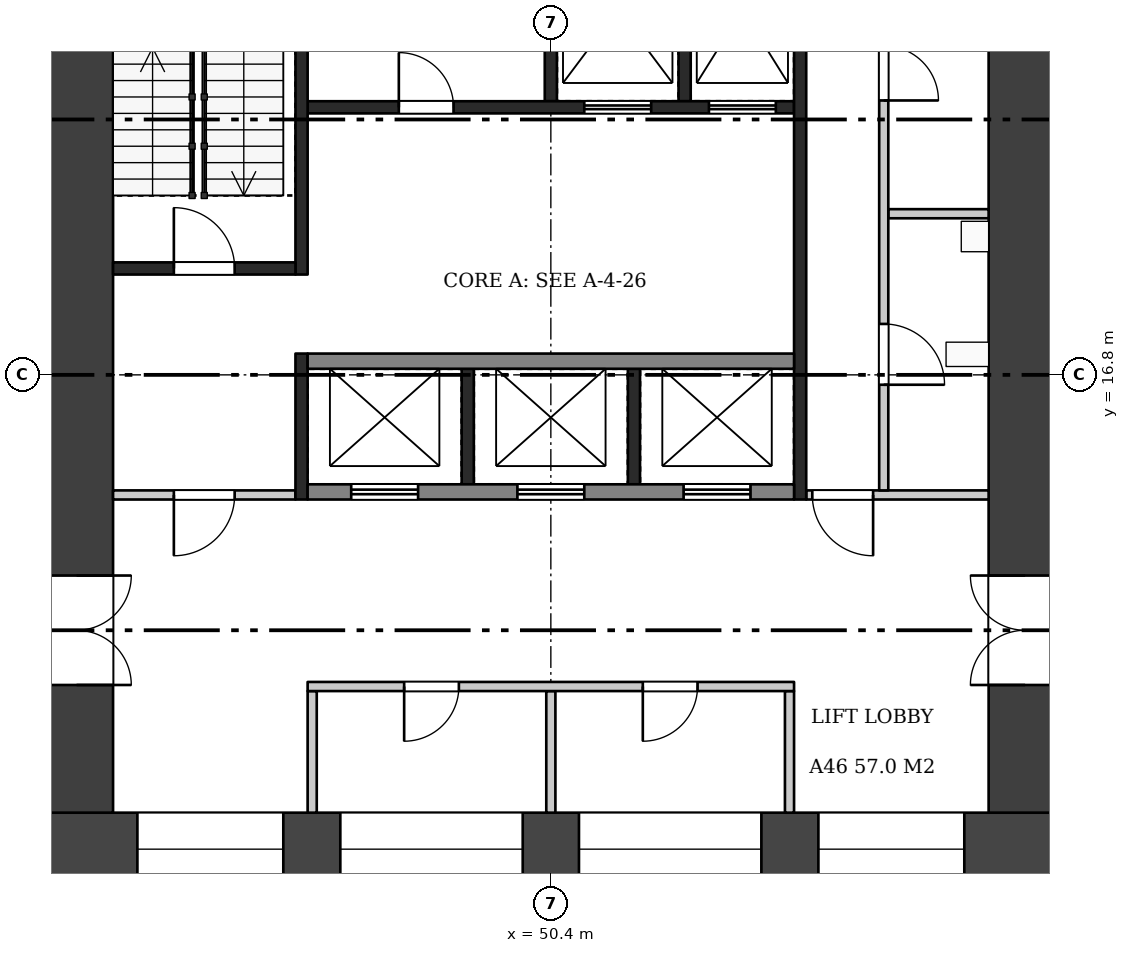
"""IFC4 building model, lengths in metres.
Left out: names, types, materials, properties, quantities, classifications, styles, units other than length and angle.
Written with IfcOpenShell. Run it as: python <this file> out.ifc"""

import sys

from ifc_helpers import new_model, si_unit, direction, frame, frame_2d, origin, place, context, subcontext, project, spatial, rectangle, extrude, element, fill, save


model = new_model("IFC4")
c1 = context("Model", 3, precision=1e-05, world=origin(), true_north=direction((0.0, 1.0)))
c2 = subcontext(c1, "Body", "Model", "MODEL_VIEW")
j1 = project(units=[si_unit("LENGTHUNIT", "METRE"), si_unit("PLANEANGLEUNIT", "RADIAN")], contexts=[c1])
p1 = place(None, origin())
s1 = spatial("IfcSite", under=j1, at=p1, CompositionType="ELEMENT")
p2 = place(p1, origin())
s2 = spatial("IfcBuilding", under=s1, at=p2, CompositionType="ELEMENT")
p3 = place(p2, frame((0.0, 0.0, 179.2)))
s3 = spatial("IfcBuildingStorey", under=s2, at=p3, CompositionType="ELEMENT", Elevation=179.2)
p4 = place(p3, frame((42.0, 9.0, 0.0), z_axis=(0.0, 0.0, 1.0), x_axis=(1.0, 0.0, 0.0)))
e1 = element("IfcWall", 1, at=p4, inside=s3, PredefinedType="SHEAR", context=c2, shape_type="SweptSolid", body=[
    extrude(rectangle(XDim=16.8, YDim=1.2, at=frame_2d((8.4, 0.0))), origin(), (0.0, 0.0, 1.0), 3.22),
])
p5 = place(p4, frame((1.6, 0.0, 0.6)))
e2 = element("IfcOpeningElement", 2, at=p5, cuts=e1, PredefinedType="OPENING", context=c2, shape_type="SweptSolid", body=[
    extrude(rectangle(XDim=2.4, YDim=2.1, at=frame_2d((1.2, 1.05))), frame((0.0, 0.61, 0.0), z_axis=(0.0, -1.0, 0.0), x_axis=(1.0, 0.0, 0.0)), (0.0, 0.0, 1.0), 1.22),
])
p6 = place(p4, frame((4.938, 0.0, 1.6)))
e3 = element("IfcOpeningElement", 3, at=p6, cuts=e1, PredefinedType="OPENING", context=c2, shape_type="SweptSolid", body=[
    extrude(rectangle(XDim=3.0, YDim=1.2, at=frame_2d((1.5, 0.6))), frame((0.0, 0.61, 0.0), z_axis=(0.0, -1.0, 0.0), x_axis=(1.0, 0.0, 0.0)), (0.0, 0.0, 1.0), 1.22),
])
p7 = place(p4, frame((8.863, 0.0, 1.6)))
e4 = element("IfcOpeningElement", 4, at=p7, cuts=e1, PredefinedType="OPENING", context=c2, shape_type="SweptSolid", body=[
    extrude(rectangle(XDim=3.0, YDim=1.2, at=frame_2d((1.5, 0.6))), frame((0.0, 0.61, 0.0), z_axis=(0.0, -1.0, 0.0), x_axis=(1.0, 0.0, 0.0)), (0.0, 0.0, 1.0), 1.22),
])
p8 = place(p4, frame((12.8, 0.0, 0.6)))
e5 = element("IfcOpeningElement", 5, at=p8, cuts=e1, PredefinedType="OPENING", context=c2, shape_type="SweptSolid", body=[
    extrude(rectangle(XDim=2.4, YDim=2.1, at=frame_2d((1.2, 1.05))), frame((0.0, 0.61, 0.0), z_axis=(0.0, -1.0, 0.0), x_axis=(1.0, 0.0, 0.0)), (0.0, 0.0, 1.0), 1.22),
])
p9 = place(p3, frame((42.6, 9.6, 0.0), z_axis=(0.0, 0.0, 1.0), x_axis=(0.0, 1.0, 0.0)))
e6 = element("IfcWall", 6, at=p9, inside=s3, PredefinedType="SHEAR", context=c2, shape_type="SweptSolid", body=[
    extrude(rectangle(XDim=14.4, YDim=1.2, at=frame_2d((7.2, 0.0))), origin(), (0.0, 0.0, 1.0), 3.22),
])
p10 = place(p9, frame((2.1, 0.0, 0.0)))
e7 = element("IfcOpeningElement", 7, at=p10, cuts=e6, PredefinedType="OPENING", context=c2, shape_type="SweptSolid", body=[
    extrude(rectangle(XDim=1.8, YDim=2.1, at=frame_2d((0.9, 1.05))), frame((0.0, 0.61, 0.0), z_axis=(0.0, -1.0, 0.0), x_axis=(1.0, 0.0, 0.0)), (0.0, 0.0, 1.0), 1.22),
])
p11 = place(p3, frame((58.2, 9.6, 0.0), z_axis=(0.0, 0.0, 1.0), x_axis=(0.0, 1.0, 0.0)))
e8 = element("IfcWall", 8, at=p11, inside=s3, PredefinedType="SHEAR", context=c2, shape_type="SweptSolid", body=[
    extrude(rectangle(XDim=14.4, YDim=1.2, at=frame_2d((7.2, 0.0))), origin(), (0.0, 0.0, 1.0), 3.22),
])
p12 = place(p11, frame((2.1, 0.0, 0.0)))
e9 = element("IfcOpeningElement", 9, at=p12, cuts=e8, PredefinedType="OPENING", context=c2, shape_type="SweptSolid", body=[
    extrude(rectangle(XDim=1.8, YDim=2.1, at=frame_2d((0.9, 1.05))), frame((0.0, 0.61, 0.0), z_axis=(0.0, -1.0, 0.0), x_axis=(1.0, 0.0, 0.0)), (0.0, 0.0, 1.0), 1.22),
])
for number, where, z_axis, x_axis in (
    (10, (46.475, 9.6, 0.0), (0.0, 0.0, 1.0), (0.0, 1.0, 0.0)),
    (11, (54.325, 9.6, 0.0), (0.0, 0.0, 1.0), (0.0, 1.0, 0.0)),
    (12, (50.4, 9.6, 0.0), (0.0, 0.0, 1.0), (0.0, 1.0, 0.0)),
):
    element("IfcWall", number, at=place(p3, frame(where, z_axis=z_axis, x_axis=x_axis)), inside=s3, PredefinedType="PARTITIONING", context=c2, shape_type="SweptSolid", body=[
        extrude(rectangle(XDim=2.0, YDim=0.15, at=frame_2d((1.0, 0.0))), origin(), (0.0, 0.0, 1.0), 3.22),
    ])
p13 = place(p3, frame((46.4, 11.675, 0.0), z_axis=(0.0, 0.0, 1.0), x_axis=(1.0, 0.0, 0.0)))
e13 = element("IfcWall", 13, at=p13, inside=s3, PredefinedType="PARTITIONING", context=c2, shape_type="SweptSolid", body=[
    extrude(rectangle(XDim=8.0, YDim=0.15, at=frame_2d((4.0, 0.0))), origin(), (0.0, 0.0, 1.0), 3.22),
])
p14 = place(p13, frame((1.587, 0.0, 0.0)))
e14 = element("IfcOpeningElement", 14, at=p14, cuts=e13, PredefinedType="OPENING", context=c2, shape_type="SweptSolid", body=[
    extrude(rectangle(XDim=0.9, YDim=2.1, at=frame_2d((0.45, 1.05))), frame((0.0, 0.085, 0.0), z_axis=(0.0, -1.0, 0.0), x_axis=(1.0, 0.0, 0.0)), (0.0, 0.0, 1.0), 0.17),
])
p15 = place(p13, frame((5.512, 0.0, 0.0)))
e15 = element("IfcOpeningElement", 15, at=p15, cuts=e13, PredefinedType="OPENING", context=c2, shape_type="SweptSolid", body=[
    extrude(rectangle(XDim=0.9, YDim=2.1, at=frame_2d((0.45, 1.05))), frame((0.0, 0.085, 0.0), z_axis=(0.0, -1.0, 0.0), x_axis=(1.0, 0.0, 0.0)), (0.0, 0.0, 1.0), 0.17),
])
for number, where, z_axis, x_axis in (
    (16, (49.033, 15.0, 0.0), (0.0, 0.0, 1.0), (0.0, 1.0, 0.0)),
    (17, (51.767, 15.0, 0.0), (0.0, 0.0, 1.0), (0.0, 1.0, 0.0)),
):
    element("IfcWall", number, at=place(p3, frame(where, z_axis=z_axis, x_axis=x_axis)), inside=s3, PredefinedType="SHEAR", context=c2, shape_type="SweptSolid", body=[
        extrude(rectangle(XDim=1.9, YDim=0.2, at=frame_2d((0.95, 0.0))), origin(), (0.0, 0.0, 1.0), 3.22),
    ])
p16 = place(p3, frame((46.4, 14.875, 0.0), z_axis=(0.0, 0.0, 1.0), x_axis=(1.0, 0.0, 0.0)))
e18 = element("IfcWall", 18, at=p16, inside=s3, PredefinedType="SHEAR", context=c2, shape_type="SweptSolid", body=[
    extrude(rectangle(XDim=8.0, YDim=0.25, at=frame_2d((4.0, 0.0))), origin(), (0.0, 0.0, 1.0), 3.22),
])
p17 = place(p16, frame((0.717, 0.0, 0.0)))
e19 = element("IfcOpeningElement", 19, at=p17, cuts=e18, PredefinedType="OPENING", context=c2, shape_type="SweptSolid", body=[
    extrude(rectangle(XDim=1.1, YDim=2.1, at=frame_2d((0.55, 1.05))), frame((0.0, 0.135, 0.0), z_axis=(0.0, -1.0, 0.0), x_axis=(1.0, 0.0, 0.0)), (0.0, 0.0, 1.0), 0.27),
])
p18 = place(p16, frame((3.45, 0.0, 0.0)))
e20 = element("IfcOpeningElement", 20, at=p18, cuts=e18, PredefinedType="OPENING", context=c2, shape_type="SweptSolid", body=[
    extrude(rectangle(XDim=1.1, YDim=2.1, at=frame_2d((0.55, 1.05))), frame((0.0, 0.135, 0.0), z_axis=(0.0, -1.0, 0.0), x_axis=(1.0, 0.0, 0.0)), (0.0, 0.0, 1.0), 0.27),
])
p19 = place(p16, frame((6.183, 0.0, 0.0)))
e21 = element("IfcOpeningElement", 21, at=p19, cuts=e18, PredefinedType="OPENING", context=c2, shape_type="SweptSolid", body=[
    extrude(rectangle(XDim=1.1, YDim=2.1, at=frame_2d((0.55, 1.05))), frame((0.0, 0.135, 0.0), z_axis=(0.0, -1.0, 0.0), x_axis=(1.0, 0.0, 0.0)), (0.0, 0.0, 1.0), 0.27),
])
p20 = place(p3, frame((46.4, 17.025, 0.0), z_axis=(0.0, 0.0, 1.0), x_axis=(1.0, 0.0, 0.0)))
e22 = element("IfcWall", 22, at=p20, inside=s3, PredefinedType="SHEAR", context=c2, shape_type="SweptSolid", body=[
    extrude(rectangle(XDim=8.0, YDim=0.25, at=frame_2d((4.0, 0.0))), origin(), (0.0, 0.0, 1.0), 3.22),
])
for number, where, z_axis, x_axis in (
    (23, (50.4, 21.3, 0.0), (0.0, 0.0, 1.0), (0.0, 1.0, 0.0)),
    (24, (52.6, 21.3, 0.0), (0.0, 0.0, 1.0), (0.0, 1.0, 0.0)),
):
    element("IfcWall", number, at=place(p3, frame(where, z_axis=z_axis, x_axis=x_axis)), inside=s3, PredefinedType="SHEAR", context=c2, shape_type="SweptSolid", body=[
        extrude(rectangle(XDim=2.7, YDim=0.2, at=frame_2d((1.35, 0.0))), origin(), (0.0, 0.0, 1.0), 3.22),
    ])
p21 = place(p3, frame((46.4, 21.2, 0.0), z_axis=(0.0, 0.0, 1.0), x_axis=(1.0, 0.0, 0.0)))
e25 = element("IfcWall", 25, at=p21, inside=s3, PredefinedType="SHEAR", context=c2, shape_type="SweptSolid", body=[
    extrude(rectangle(XDim=8.0, YDim=0.2, at=frame_2d((4.0, 0.0))), origin(), (0.0, 0.0, 1.0), 3.22),
])
p22 = place(p21, frame((1.5, 0.0, 0.0)))
e26 = element("IfcOpeningElement", 26, at=p22, cuts=e25, PredefinedType="OPENING", context=c2, shape_type="SweptSolid", body=[
    extrude(rectangle(XDim=0.9, YDim=2.1, at=frame_2d((0.45, 1.05))), frame((0.0, 0.11, 0.0), z_axis=(0.0, -1.0, 0.0), x_axis=(1.0, 0.0, 0.0)), (0.0, 0.0, 1.0), 0.22),
])
p23 = place(p21, frame((4.55, 0.0, 0.0)))
e27 = element("IfcOpeningElement", 27, at=p23, cuts=e25, PredefinedType="OPENING", context=c2, shape_type="SweptSolid", body=[
    extrude(rectangle(XDim=1.1, YDim=2.1, at=frame_2d((0.55, 1.05))), frame((0.0, 0.11, 0.0), z_axis=(0.0, -1.0, 0.0), x_axis=(1.0, 0.0, 0.0)), (0.0, 0.0, 1.0), 0.22),
])
p24 = place(p21, frame((6.6, 0.0, 0.0)))
e28 = element("IfcOpeningElement", 28, at=p24, cuts=e25, PredefinedType="OPENING", context=c2, shape_type="SweptSolid", body=[
    extrude(rectangle(XDim=1.1, YDim=2.1, at=frame_2d((0.55, 1.05))), frame((0.0, 0.11, 0.0), z_axis=(0.0, -1.0, 0.0), x_axis=(1.0, 0.0, 0.0)), (0.0, 0.0, 1.0), 0.22),
])
p25 = place(p3, frame((46.3, 14.75, 0.0), z_axis=(0.0, 0.0, 1.0), x_axis=(0.0, 1.0, 0.0)))
e29 = element("IfcWall", 29, at=p25, inside=s3, PredefinedType="SHEAR", context=c2, shape_type="SweptSolid", body=[
    extrude(rectangle(XDim=2.4, YDim=0.2, at=frame_2d((1.2, 0.0))), origin(), (0.0, 0.0, 1.0), 3.22),
])
p26 = place(p3, frame((46.3, 18.45, 0.0), z_axis=(0.0, 0.0, 1.0), x_axis=(0.0, 1.0, 0.0)))
e30 = element("IfcWall", 30, at=p26, inside=s3, PredefinedType="SHEAR", context=c2, shape_type="SweptSolid", body=[
    extrude(rectangle(XDim=5.55, YDim=0.2, at=frame_2d((2.775, 0.0))), origin(), (0.0, 0.0, 1.0), 3.22),
])
p27 = place(p3, frame((43.2, 14.825, 0.0), z_axis=(0.0, 0.0, 1.0), x_axis=(1.0, 0.0, 0.0)))
e31 = element("IfcWall", 31, at=p27, inside=s3, PredefinedType="PARTITIONING", context=c2, shape_type="SweptSolid", body=[
    extrude(rectangle(XDim=3.0, YDim=0.15, at=frame_2d((1.5, 0.0))), origin(), (0.0, 0.0, 1.0), 3.22),
])
p28 = place(p27, frame((1.0, 0.0, 0.0)))
e32 = element("IfcOpeningElement", 32, at=p28, cuts=e31, PredefinedType="OPENING", context=c2, shape_type="SweptSolid", body=[
    extrude(rectangle(XDim=1.0, YDim=2.1, at=frame_2d((0.5, 1.05))), frame((0.0, 0.085, 0.0), z_axis=(0.0, -1.0, 0.0), x_axis=(1.0, 0.0, 0.0)), (0.0, 0.0, 1.0), 0.17),
])
p29 = place(p3, frame((43.2, 18.55, 0.0), z_axis=(0.0, 0.0, 1.0), x_axis=(1.0, 0.0, 0.0)))
e33 = element("IfcWall", 33, at=p29, inside=s3, PredefinedType="SHEAR", context=c2, shape_type="SweptSolid", body=[
    extrude(rectangle(XDim=3.0, YDim=0.2, at=frame_2d((1.5, 0.0))), origin(), (0.0, 0.0, 1.0), 3.22),
])
p30 = place(p29, frame((1.0, 0.0, 0.0)))
e34 = element("IfcOpeningElement", 34, at=p30, cuts=e33, PredefinedType="OPENING", context=c2, shape_type="SweptSolid", body=[
    extrude(rectangle(XDim=1.0, YDim=2.1, at=frame_2d((0.5, 1.05))), frame((0.0, 0.11, 0.0), z_axis=(0.0, -1.0, 0.0), x_axis=(1.0, 0.0, 0.0)), (0.0, 0.0, 1.0), 0.22),
])
p31 = place(p3, frame((54.5, 14.75, 0.0), z_axis=(0.0, 0.0, 1.0), x_axis=(0.0, 1.0, 0.0)))
e35 = element("IfcWall", 35, at=p31, inside=s3, PredefinedType="SHEAR", context=c2, shape_type="SweptSolid", body=[
    extrude(rectangle(XDim=9.25, YDim=0.2, at=frame_2d((4.625, 0.0))), origin(), (0.0, 0.0, 1.0), 3.22),
])
p32 = place(p3, frame((54.6, 14.825, 0.0), z_axis=(0.0, 0.0, 1.0), x_axis=(1.0, 0.0, 0.0)))
e36 = element("IfcWall", 36, at=p32, inside=s3, PredefinedType="PARTITIONING", context=c2, shape_type="SweptSolid", body=[
    extrude(rectangle(XDim=3.0, YDim=0.15, at=frame_2d((1.5, 0.0))), origin(), (0.0, 0.0, 1.0), 3.22),
])
p33 = place(p32, frame((0.1, 0.0, 0.0)))
e37 = element("IfcOpeningElement", 37, at=p33, cuts=e36, PredefinedType="OPENING", context=c2, shape_type="SweptSolid", body=[
    extrude(rectangle(XDim=1.0, YDim=2.1, at=frame_2d((0.5, 1.05))), frame((0.0, 0.085, 0.0), z_axis=(0.0, -1.0, 0.0), x_axis=(1.0, 0.0, 0.0)), (0.0, 0.0, 1.0), 0.17),
])
p34 = place(p3, frame((55.95, 19.45, 0.0), z_axis=(0.0, 0.0, 1.0), x_axis=(1.0, 0.0, 0.0)))
e38 = element("IfcWall", 38, at=p34, inside=s3, PredefinedType="PARTITIONING", context=c2, shape_type="SweptSolid", body=[
    extrude(rectangle(XDim=1.65, YDim=0.15, at=frame_2d((0.825, 0.0))), origin(), (0.0, 0.0, 1.0), 3.22),
])
p35 = place(p3, frame((55.875, 14.9, 0.0), z_axis=(0.0, 0.0, 1.0), x_axis=(0.0, 1.0, 0.0)))
e39 = element("IfcWall", 39, at=p35, inside=s3, PredefinedType="PARTITIONING", context=c2, shape_type="SweptSolid", body=[
    extrude(rectangle(XDim=9.1, YDim=0.15, at=frame_2d((4.55, 0.0))), origin(), (0.0, 0.0, 1.0), 3.22),
])
p36 = place(p35, frame((1.738, 0.0, 0.0)))
e40 = element("IfcOpeningElement", 40, at=p36, cuts=e39, PredefinedType="OPENING", context=c2, shape_type="SweptSolid", body=[
    extrude(rectangle(XDim=1.0, YDim=2.1, at=frame_2d((0.5, 1.05))), frame((0.0, 0.085, 0.0), z_axis=(0.0, -1.0, 0.0), x_axis=(1.0, 0.0, 0.0)), (0.0, 0.0, 1.0), 0.17),
])
p37 = place(p35, frame((6.413, 0.0, 0.0)))
e41 = element("IfcOpeningElement", 41, at=p37, cuts=e39, PredefinedType="OPENING", context=c2, shape_type="SweptSolid", body=[
    extrude(rectangle(XDim=0.9, YDim=2.1, at=frame_2d((0.45, 1.05))), frame((0.0, 0.085, 0.0), z_axis=(0.0, -1.0, 0.0), x_axis=(1.0, 0.0, 0.0)), (0.0, 0.0, 1.0), 0.17),
])
p38 = place(p10, frame((1.8, 0.0, 0.0), z_axis=(0.0, 0.0, 1.0), x_axis=(-1.0, 0.0, 0.0)))
e42 = element("IfcDoor", 42, at=p38, inside=s3, OperationType="DOUBLE_DOOR_SINGLE_SWING", PredefinedType="DOOR", context=c2, shape_type="SweptSolid", body=[
    extrude(rectangle(XDim=1.8, YDim=2.1, at=frame_2d((0.9, 1.05))), frame((0.0, 0.025, 0.0), z_axis=(0.0, -1.0, 0.0), x_axis=(1.0, 0.0, 0.0)), (0.0, 0.0, 1.0), 0.05),
])
fill(e7, e42)
p39 = place(p12, origin())
e43 = element("IfcDoor", 43, at=p39, inside=s3, OperationType="DOUBLE_DOOR_SINGLE_SWING", PredefinedType="DOOR", context=c2, shape_type="SweptSolid", body=[
    extrude(rectangle(XDim=1.8, YDim=2.1, at=frame_2d((0.9, 1.05))), frame((0.0, 0.025, 0.0), z_axis=(0.0, -1.0, 0.0), x_axis=(1.0, 0.0, 0.0)), (0.0, 0.0, 1.0), 0.05),
])
fill(e9, e43)
p40 = place(p14, frame((0.9, 0.0, 0.0), z_axis=(0.0, 0.0, 1.0), x_axis=(-1.0, 0.0, 0.0)))
e44 = element("IfcDoor", 44, at=p40, inside=s3, OperationType="SINGLE_SWING_RIGHT", PredefinedType="DOOR", context=c2, shape_type="SweptSolid", body=[
    extrude(rectangle(XDim=0.9, YDim=2.1, at=frame_2d((0.45, 1.05))), frame((0.0, 0.025, 0.0), z_axis=(0.0, -1.0, 0.0), x_axis=(1.0, 0.0, 0.0)), (0.0, 0.0, 1.0), 0.05),
])
fill(e14, e44)
p41 = place(p15, frame((0.9, 0.0, 0.0), z_axis=(0.0, 0.0, 1.0), x_axis=(-1.0, 0.0, 0.0)))
e45 = element("IfcDoor", 45, at=p41, inside=s3, OperationType="SINGLE_SWING_RIGHT", PredefinedType="DOOR", context=c2, shape_type="SweptSolid", body=[
    extrude(rectangle(XDim=0.9, YDim=2.1, at=frame_2d((0.45, 1.05))), frame((0.0, 0.025, 0.0), z_axis=(0.0, -1.0, 0.0), x_axis=(1.0, 0.0, 0.0)), (0.0, 0.0, 1.0), 0.05),
])
fill(e15, e45)
p42 = place(p17, origin())
e46 = element("IfcDoor", 46, at=p42, inside=s3, OperationType="DOUBLE_DOOR_SLIDING", PredefinedType="DOOR", context=c2, shape_type="SweptSolid", body=[
    extrude(rectangle(XDim=1.1, YDim=2.1, at=frame_2d((0.55, 1.05))), frame((0.0, 0.025, 0.0), z_axis=(0.0, -1.0, 0.0), x_axis=(1.0, 0.0, 0.0)), (0.0, 0.0, 1.0), 0.05),
])
fill(e19, e46)
p43 = place(p18, origin())
e47 = element("IfcDoor", 47, at=p43, inside=s3, OperationType="DOUBLE_DOOR_SLIDING", PredefinedType="DOOR", context=c2, shape_type="SweptSolid", body=[
    extrude(rectangle(XDim=1.1, YDim=2.1, at=frame_2d((0.55, 1.05))), frame((0.0, 0.025, 0.0), z_axis=(0.0, -1.0, 0.0), x_axis=(1.0, 0.0, 0.0)), (0.0, 0.0, 1.0), 0.05),
])
fill(e20, e47)
p44 = place(p19, origin())
e48 = element("IfcDoor", 48, at=p44, inside=s3, OperationType="DOUBLE_DOOR_SLIDING", PredefinedType="DOOR", context=c2, shape_type="SweptSolid", body=[
    extrude(rectangle(XDim=1.1, YDim=2.1, at=frame_2d((0.55, 1.05))), frame((0.0, 0.025, 0.0), z_axis=(0.0, -1.0, 0.0), x_axis=(1.0, 0.0, 0.0)), (0.0, 0.0, 1.0), 0.05),
])
fill(e21, e48)
p45 = place(p22, origin())
e49 = element("IfcDoor", 49, at=p45, inside=s3, OperationType="SINGLE_SWING_LEFT", PredefinedType="DOOR", context=c2, shape_type="SweptSolid", body=[
    extrude(rectangle(XDim=0.9, YDim=2.1, at=frame_2d((0.45, 1.05))), frame((0.0, 0.025, 0.0), z_axis=(0.0, -1.0, 0.0), x_axis=(1.0, 0.0, 0.0)), (0.0, 0.0, 1.0), 0.05),
])
fill(e26, e49)
p46 = place(p23, origin())
e50 = element("IfcDoor", 50, at=p46, inside=s3, OperationType="DOUBLE_DOOR_SLIDING", PredefinedType="DOOR", context=c2, shape_type="SweptSolid", body=[
    extrude(rectangle(XDim=1.1, YDim=2.1, at=frame_2d((0.55, 1.05))), frame((0.0, 0.025, 0.0), z_axis=(0.0, -1.0, 0.0), x_axis=(1.0, 0.0, 0.0)), (0.0, 0.0, 1.0), 0.05),
])
fill(e27, e50)
p47 = place(p24, origin())
e51 = element("IfcDoor", 51, at=p47, inside=s3, OperationType="DOUBLE_DOOR_SLIDING", PredefinedType="DOOR", context=c2, shape_type="SweptSolid", body=[
    extrude(rectangle(XDim=1.1, YDim=2.1, at=frame_2d((0.55, 1.05))), frame((0.0, 0.025, 0.0), z_axis=(0.0, -1.0, 0.0), x_axis=(1.0, 0.0, 0.0)), (0.0, 0.0, 1.0), 0.05),
])
fill(e28, e51)
p48 = place(p28, frame((1.0, 0.0, 0.0), z_axis=(0.0, 0.0, 1.0), x_axis=(-1.0, 0.0, 0.0)))
e52 = element("IfcDoor", 52, at=p48, inside=s3, OperationType="SINGLE_SWING_RIGHT", PredefinedType="DOOR", context=c2, shape_type="SweptSolid", body=[
    extrude(rectangle(XDim=1.0, YDim=2.1, at=frame_2d((0.5, 1.05))), frame((0.0, 0.025, 0.0), z_axis=(0.0, -1.0, 0.0), x_axis=(1.0, 0.0, 0.0)), (0.0, 0.0, 1.0), 0.05),
])
fill(e32, e52)
p49 = place(p30, origin())
e53 = element("IfcDoor", 53, at=p49, inside=s3, OperationType="SINGLE_SWING_LEFT", PredefinedType="DOOR", context=c2, shape_type="SweptSolid", body=[
    extrude(rectangle(XDim=1.0, YDim=2.1, at=frame_2d((0.5, 1.05))), frame((0.0, 0.025, 0.0), z_axis=(0.0, -1.0, 0.0), x_axis=(1.0, 0.0, 0.0)), (0.0, 0.0, 1.0), 0.05),
])
fill(e34, e53)
p50 = place(p33, frame((1.0, 0.0, 0.0), z_axis=(0.0, 0.0, 1.0), x_axis=(-1.0, 0.0, 0.0)))
e54 = element("IfcDoor", 54, at=p50, inside=s3, OperationType="SINGLE_SWING_LEFT", PredefinedType="DOOR", context=c2, shape_type="SweptSolid", body=[
    extrude(rectangle(XDim=1.0, YDim=2.1, at=frame_2d((0.5, 1.05))), frame((0.0, 0.025, 0.0), z_axis=(0.0, -1.0, 0.0), x_axis=(1.0, 0.0, 0.0)), (0.0, 0.0, 1.0), 0.05),
])
fill(e37, e54)
p51 = place(p36, frame((1.0, 0.0, 0.0), z_axis=(0.0, 0.0, 1.0), x_axis=(-1.0, 0.0, 0.0)))
e55 = element("IfcDoor", 55, at=p51, inside=s3, OperationType="SINGLE_SWING_RIGHT", PredefinedType="DOOR", context=c2, shape_type="SweptSolid", body=[
    extrude(rectangle(XDim=1.0, YDim=2.1, at=frame_2d((0.5, 1.05))), frame((0.0, 0.025, 0.0), z_axis=(0.0, -1.0, 0.0), x_axis=(1.0, 0.0, 0.0)), (0.0, 0.0, 1.0), 0.05),
])
fill(e40, e55)
p52 = place(p37, frame((0.9, 0.0, 0.0), z_axis=(0.0, 0.0, 1.0), x_axis=(-1.0, 0.0, 0.0)))
e56 = element("IfcDoor", 56, at=p52, inside=s3, OperationType="SINGLE_SWING_RIGHT", PredefinedType="DOOR", context=c2, shape_type="SweptSolid", body=[
    extrude(rectangle(XDim=0.9, YDim=2.1, at=frame_2d((0.45, 1.05))), frame((0.0, 0.025, 0.0), z_axis=(0.0, -1.0, 0.0), x_axis=(1.0, 0.0, 0.0)), (0.0, 0.0, 1.0), 0.05),
])
fill(e41, e56)
p53 = place(p5, origin())
e57 = element("IfcWindow", 57, at=p53, inside=s3, PartitioningType="SINGLE_PANEL", PredefinedType="WINDOW", context=c2, shape_type="SweptSolid", body=[
    extrude(rectangle(XDim=2.4, YDim=2.1, at=frame_2d((1.2, 1.05))), frame((0.0, 0.03, 0.0), z_axis=(0.0, -1.0, 0.0), x_axis=(1.0, 0.0, 0.0)), (0.0, 0.0, 1.0), 0.06),
])
fill(e2, e57)
p54 = place(p6, origin())
e58 = element("IfcWindow", 58, at=p54, inside=s3, PartitioningType="SINGLE_PANEL", PredefinedType="WINDOW", context=c2, shape_type="SweptSolid", body=[
    extrude(rectangle(XDim=3.0, YDim=1.2, at=frame_2d((1.5, 0.6))), frame((0.0, 0.03, 0.0), z_axis=(0.0, -1.0, 0.0), x_axis=(1.0, 0.0, 0.0)), (0.0, 0.0, 1.0), 0.06),
])
fill(e3, e58)
p55 = place(p7, origin())
e59 = element("IfcWindow", 59, at=p55, inside=s3, PartitioningType="SINGLE_PANEL", PredefinedType="WINDOW", context=c2, shape_type="SweptSolid", body=[
    extrude(rectangle(XDim=3.0, YDim=1.2, at=frame_2d((1.5, 0.6))), frame((0.0, 0.03, 0.0), z_axis=(0.0, -1.0, 0.0), x_axis=(1.0, 0.0, 0.0)), (0.0, 0.0, 1.0), 0.06),
])
fill(e4, e59)
p56 = place(p8, origin())
e60 = element("IfcWindow", 60, at=p56, inside=s3, PartitioningType="SINGLE_PANEL", PredefinedType="WINDOW", context=c2, shape_type="SweptSolid", body=[
    extrude(rectangle(XDim=2.4, YDim=2.1, at=frame_2d((1.2, 1.05))), frame((0.0, 0.03, 0.0), z_axis=(0.0, -1.0, 0.0), x_axis=(1.0, 0.0, 0.0)), (0.0, 0.0, 1.0), 0.06),
])
fill(e5, e60)
save(model, sys.argv[1])
